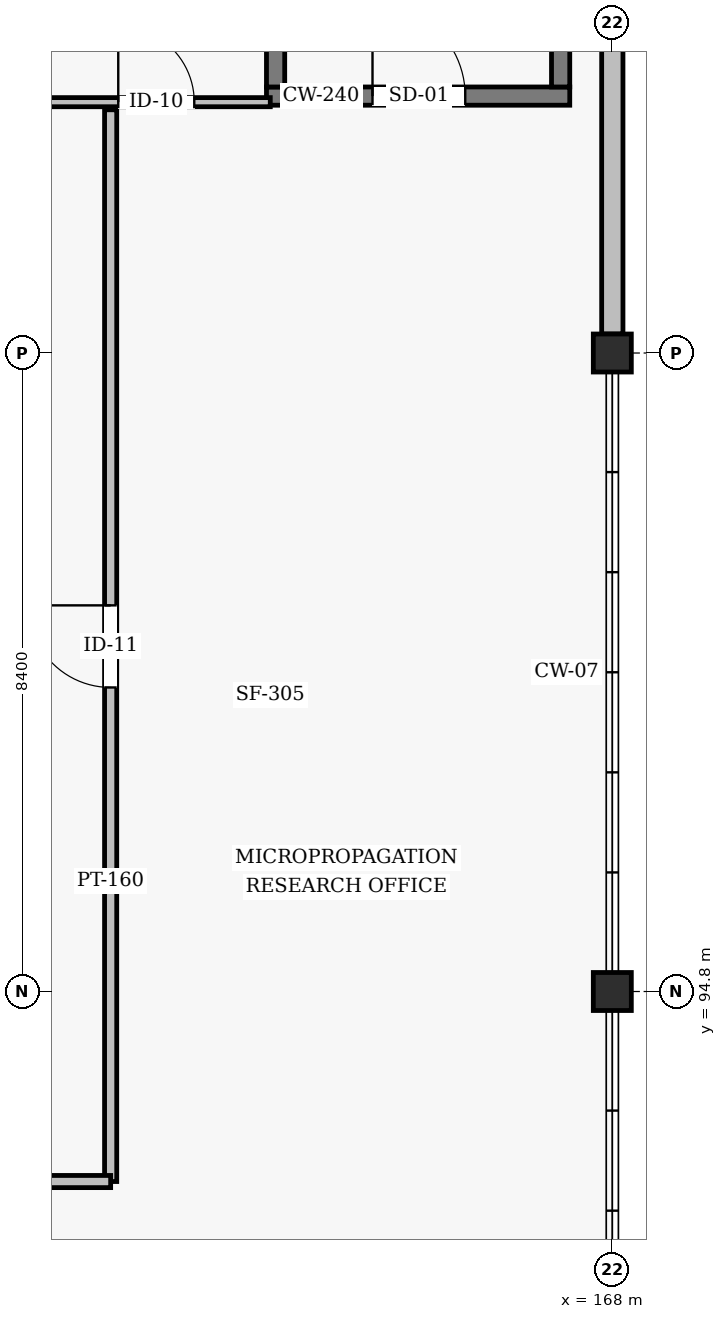
"""IFC4 building model, lengths in metres.
Left out: names, types, materials, properties, quantities, classifications, styles, units other than length and angle.
Written with IfcOpenShell. Run it as: python <this file> out.ifc"""

import sys

from ifc_helpers import new_model, si_unit, direction, frame, frame_2d, origin, origin_2d, place, context, subcontext, project, spatial, rectangle, hollow_rectangle, extrude, element, fill, save


model = new_model("IFC4")
c1 = context("Model", 3, precision=1e-05, world=origin(), true_north=direction((0.0, 1.0)))
c2 = subcontext(c1, "Body", "Model", "MODEL_VIEW")
j1 = project(units=[si_unit("LENGTHUNIT", "METRE"), si_unit("PLANEANGLEUNIT", "RADIAN")], contexts=[c1])
p1 = place(None, origin())
s1 = spatial("IfcSite", under=j1, at=p1, CompositionType="ELEMENT")
p2 = place(p1, origin())
s2 = spatial("IfcBuilding", under=s1, at=p2, CompositionType="ELEMENT")
p3 = place(p2, frame((0.0, 0.0, 35.4)))
s3 = spatial("IfcBuildingStorey", under=s2, at=p3, CompositionType="ELEMENT", Elevation=35.4)
for number, where, z_axis, x_axis in (
    (1, (168.0, 94.8, 0.0), (0.0, 0.0, 1.0), (1.0, 0.0, 0.0)),
    (2, (168.0, 103.2, 0.0), (0.0, 0.0, 1.0), (1.0, 0.0, 0.0)),
):
    element("IfcColumn", number, at=place(p3, frame(where, z_axis=z_axis, x_axis=x_axis)), inside=s3, PredefinedType="COLUMN", context=c2, shape_type="SweptSolid", body=[
        extrude(hollow_rectangle(XDim=0.5, YDim=0.5, WallThickness=0.02, InnerFilletRadius=0.02, OuterFilletRadius=0.04, at=origin_2d()), origin(), (0.0, 0.0, 1.0), 4.2),
    ])
p4 = place(p3, frame((168.0, 103.45, 0.0), z_axis=(0.0, 0.0, 1.0), x_axis=(0.0, 1.0, 0.0)))
e3 = element("IfcWall", 3, at=p4, inside=s3, PredefinedType="SOLIDWALL", context=c2, shape_type="SweptSolid", body=[
    extrude(rectangle(XDim=11.5, YDim=0.28, at=frame_2d((5.75, 0.0))), origin(), (0.0, 0.0, 1.0), 3.156),
])
p5 = place(p3, frame((163.45, 106.58, 0.0), z_axis=(0.0, 0.0, 1.0), x_axis=(1.0, 0.0, 0.0)))
e4 = element("IfcWall", 4, at=p5, inside=s3, PredefinedType="SHEAR", context=c2, shape_type="SweptSolid", body=[
    extrude(rectangle(XDim=3.99, YDim=0.24, at=frame_2d((1.995, 0.0))), origin(), (0.0, 0.0, 1.0), 3.948),
])
p6 = place(p5, frame((1.395, 0.0, 0.0)))
e5 = element("IfcOpeningElement", 5, at=p6, cuts=e4, PredefinedType="OPENING", context=c2, shape_type="SweptSolid", body=[
    extrude(rectangle(XDim=1.22, YDim=2.18, at=frame_2d((0.61, 1.09))), frame((0.0, 0.13, 0.0), z_axis=(0.0, -1.0, 0.0), x_axis=(1.0, 0.0, 0.0)), (0.0, 0.0, 1.0), 0.26),
])
for number, where, z_axis, x_axis in (
    (6, (163.57, 106.7, 0.0), (0.0, 0.0, 1.0), (0.0, 1.0, 0.0)),
    (7, (167.32, 106.7, 0.0), (0.0, 0.0, 1.0), (0.0, 1.0, 0.0)),
):
    element("IfcWall", number, at=place(p3, frame(where, z_axis=z_axis, x_axis=x_axis)), inside=s3, PredefinedType="SHEAR", context=c2, shape_type="SweptSolid", body=[
        extrude(rectangle(XDim=7.9, YDim=0.24, at=frame_2d((3.95, 0.0))), origin(), (0.0, 0.0, 1.0), 3.948),
    ])
p7 = place(p3, frame((160.5, 106.5, 0.0), z_axis=(0.0, 0.0, 1.0), x_axis=(1.0, 0.0, 0.0)))
e8 = element("IfcWall", 8, at=p7, inside=s3, PredefinedType="PARTITIONING", context=c2, shape_type="SweptSolid", body=[
    extrude(rectangle(XDim=3.0, YDim=0.12, at=frame_2d((1.5, 0.0))), origin(), (0.0, 0.0, 1.0), 3.948),
])
p8 = place(p7, frame((1.0, 0.0, 0.0)))
e9 = element("IfcOpeningElement", 9, at=p8, cuts=e8, PredefinedType="OPENING", context=c2, shape_type="SweptSolid", body=[
    extrude(rectangle(XDim=1.0, YDim=2.1, at=frame_2d((0.5, 1.05))), frame((0.0, 0.07, 0.0), z_axis=(0.0, -1.0, 0.0), x_axis=(1.0, 0.0, 0.0)), (0.0, 0.0, 1.0), 0.14),
])
p9 = place(p3, frame((161.4, 92.3, 0.0), z_axis=(0.0, 0.0, 1.0), x_axis=(0.0, 1.0, 0.0)))
e10 = element("IfcWall", 10, at=p9, inside=s3, PredefinedType="PARTITIONING", context=c2, shape_type="SweptSolid", body=[
    extrude(rectangle(XDim=14.1, YDim=0.16, at=frame_2d((7.05, 0.0))), origin(), (0.0, 0.0, 1.0), 3.348),
])
p10 = place(p9, frame((6.5, 0.0, 0.0)))
e11 = element("IfcOpeningElement", 11, at=p10, cuts=e10, PredefinedType="OPENING", context=c2, shape_type="SweptSolid", body=[
    extrude(rectangle(XDim=1.08, YDim=2.08, at=frame_2d((0.54, 1.04))), frame((0.0, 0.09, 0.0), z_axis=(0.0, -1.0, 0.0), x_axis=(1.0, 0.0, 0.0)), (0.0, 0.0, 1.0), 0.18),
])
p11 = place(p3, frame((150.0, 92.3, 0.0), z_axis=(0.0, 0.0, 1.0), x_axis=(1.0, 0.0, 0.0)))
e12 = element("IfcWall", 12, at=p11, inside=s3, PredefinedType="PARTITIONING", context=c2, shape_type="SweptSolid", body=[
    extrude(rectangle(XDim=11.4, YDim=0.16, at=frame_2d((5.7, 0.0))), origin(), (0.0, 0.0, 1.0), 3.448),
])
p12 = place(p11, frame((5.1, 0.0, 0.0)))
e13 = element("IfcOpeningElement", 13, at=p12, cuts=e12, PredefinedType="OPENING", context=c2, shape_type="SweptSolid", body=[
    extrude(rectangle(XDim=1.2, YDim=2.08, at=frame_2d((0.6, 1.04))), frame((0.0, 0.09, 0.0), z_axis=(0.0, -1.0, 0.0), x_axis=(1.0, 0.0, 0.0)), (0.0, 0.0, 1.0), 0.18),
])
p13 = place(p6, origin())
e14 = element("IfcDoor", 14, at=p13, inside=s3, OperationType="SINGLE_SWING_LEFT", PredefinedType="DOOR", context=c2, shape_type="SweptSolid", body=[
    extrude(rectangle(XDim=1.22, YDim=2.18, at=frame_2d((0.61, 1.09))), frame((0.0, 0.025, 0.0), z_axis=(0.0, -1.0, 0.0), x_axis=(1.0, 0.0, 0.0)), (0.0, 0.0, 1.0), 0.05),
])
fill(e5, e14)
p14 = place(p8, origin())
e15 = element("IfcDoor", 15, at=p14, inside=s3, OperationType="SINGLE_SWING_LEFT", PredefinedType="DOOR", context=c2, shape_type="SweptSolid", body=[
    extrude(rectangle(XDim=1.0, YDim=2.1, at=frame_2d((0.5, 1.05))), frame((0.0, 0.025, 0.0), z_axis=(0.0, -1.0, 0.0), x_axis=(1.0, 0.0, 0.0)), (0.0, 0.0, 1.0), 0.05),
])
fill(e9, e15)
p15 = place(p10, origin())
e16 = element("IfcDoor", 16, at=p15, inside=s3, OperationType="SINGLE_SWING_RIGHT", PredefinedType="DOOR", context=c2, shape_type="SweptSolid", body=[
    extrude(rectangle(XDim=1.08, YDim=2.08, at=frame_2d((0.54, 1.04))), frame((0.0, 0.025, 0.0), z_axis=(0.0, -1.0, 0.0), x_axis=(1.0, 0.0, 0.0)), (0.0, 0.0, 1.0), 0.05),
])
fill(e11, e16)
save(model, sys.argv[1])
